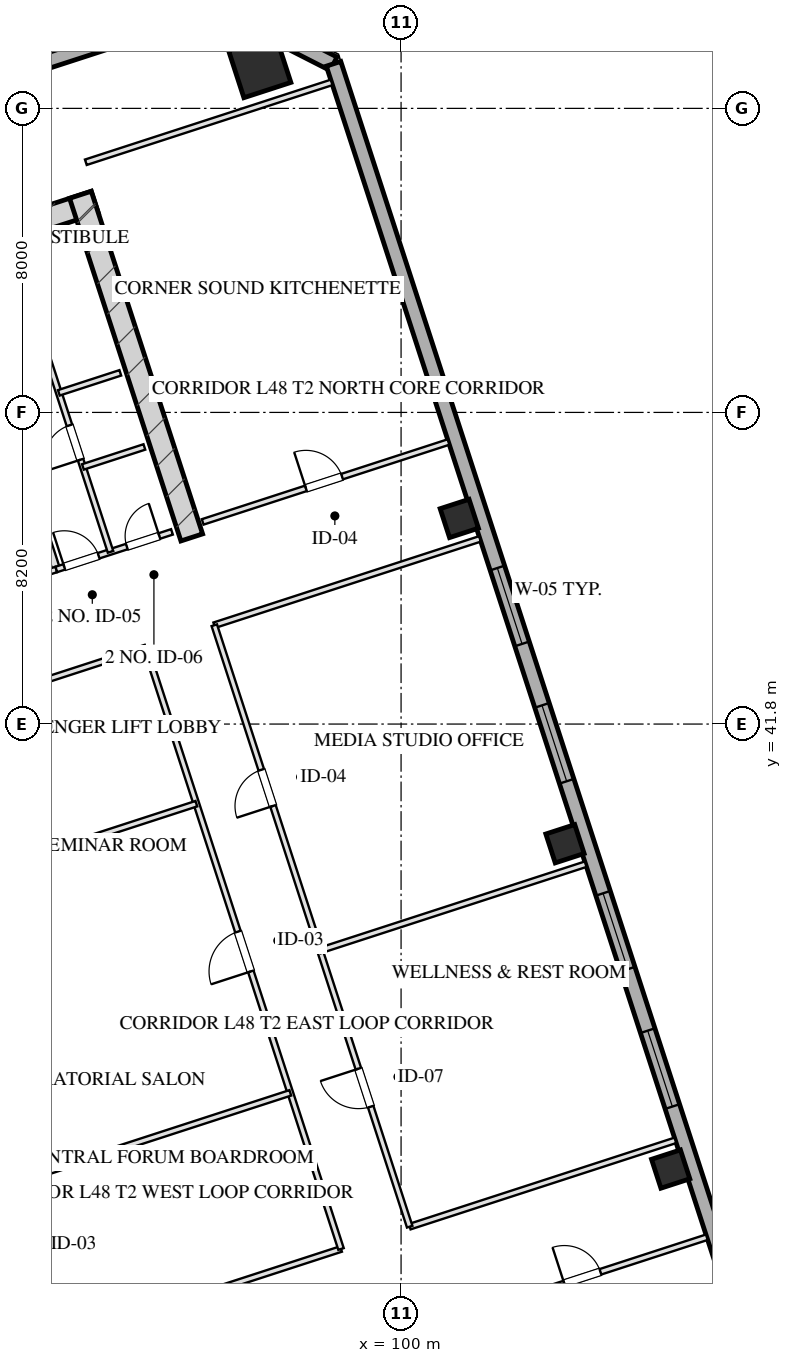
"""IFC4 building model, lengths in metres.
Left out: names, types, materials, properties, quantities, classifications, styles, units other than length and angle.
Written with IfcOpenShell. Run it as: python <this file> out.ifc"""

import sys

from ifc_helpers import new_model, si_unit, direction, frame, frame_2d, origin, origin_2d, place, context, subcontext, project, spatial, rectangle, hollow_rectangle, extrude, element, fill, save


model = new_model("IFC4")
c1 = context("Model", 3, precision=1e-05, world=origin(), true_north=direction((0.0, 1.0)))
c2 = subcontext(c1, "Body", "Model", "MODEL_VIEW")
j1 = project(units=[si_unit("LENGTHUNIT", "METRE"), si_unit("PLANEANGLEUNIT", "RADIAN")], contexts=[c1])
p1 = place(None, origin())
s1 = spatial("IfcSite", under=j1, at=p1, CompositionType="ELEMENT")
p2 = place(p1, origin())
s2 = spatial("IfcBuilding", under=s1, at=p2, CompositionType="ELEMENT")
p3 = place(p2, frame((0.0, 0.0, 180.55)))
s3 = spatial("IfcBuildingStorey", under=s2, at=p3, CompositionType="ELEMENT", Elevation=180.55)
p4 = place(p3, frame((76.344, 50.466, 0.0), z_axis=(0.0, 0.0, 1.0), x_axis=(0.951055727519, 0.309019421968, 0.0)))
e1 = element("IfcWall", 1, at=p4, inside=s3, PredefinedType="SHEAR", context=c2, shape_type="SweptSolid", body=[
    extrude(rectangle(XDim=16.4, YDim=0.6, at=frame_2d((8.2, 0.0))), origin(), (0.0, 0.0, 1.0), 3.45),
])
p5 = place(p3, frame((94.492, 46.71, 0.0), z_axis=(0.0, 0.0, 1.0), x_axis=(-0.309010370028, 0.95105866865, 0.0)))
e2 = element("IfcWall", 2, at=p5, inside=s3, PredefinedType="SHEAR", context=c2, shape_type="SweptSolid", body=[
    extrude(rectangle(XDim=9.48, YDim=0.6, at=frame_2d((4.74, 0.0))), origin(), (0.0, 0.0, 1.0), 3.45),
])
p6 = place(p3, frame((96.281, 59.099, 0.0), z_axis=(0.0, 0.0, 1.0), x_axis=(0.951056516295, 0.309016994375, 0.0)))
e3 = element("IfcColumn", 3, at=p6, inside=s3, PredefinedType="COLUMN", context=c2, shape_type="SweptSolid", body=[
    extrude(hollow_rectangle(XDim=1.3, YDim=1.3, WallThickness=0.045, at=origin_2d()), origin(), (0.0, 0.0, 1.0), 3.451),
])
for number, where, z_axis, x_axis in (
    (4, (107.094, 30.091, 0.0), (0.0, 0.0, 1.0), (0.951, 0.309, 0.0)),
    (5, (104.313, 38.651, 0.0), (0.0, 0.0, 1.0), (0.951, 0.309, 0.0)),
    (6, (101.532, 47.21, 0.0), (0.0, 0.0, 1.0), (0.951, 0.309, 0.0)),
):
    element("IfcColumn", number, at=place(p3, frame(where, z_axis=z_axis, x_axis=x_axis)), inside=s3, PredefinedType="COLUMN", context=c2, shape_type="SweptSolid", body=[
        extrude(hollow_rectangle(XDim=0.8, YDim=0.8, WallThickness=0.028, at=origin_2d()), origin(), (0.0, 0.0, 1.0), 3.451),
    ])
p7 = place(p3, frame((70.092, 52.556, 0.0), z_axis=(0.0, 0.0, 1.0), x_axis=(0.951057580055, 0.30901372044, 0.0)))
e7 = element("IfcWall", 7, at=p7, inside=s3, PredefinedType="SOLIDWALL", context=c2, shape_type="SweptSolid", body=[
    extrude(rectangle(XDim=26.4, YDim=0.4, at=frame_2d((13.2, 0.0))), origin(), (0.0, 0.0, 1.0), 2.55),
])
p8 = place(p3, frame((95.199, 60.714, 0.0), z_axis=(0.0, 0.0, 1.0), x_axis=(0.891020832027, -0.453962417932, 0.0)))
e8 = element("IfcWall", 8, at=p8, inside=s3, PredefinedType="SOLIDWALL", context=c2, shape_type="SweptSolid", body=[
    extrude(rectangle(XDim=3.394, YDim=0.4, at=frame_2d((1.697, 0.0))), origin(), (0.0, 0.0, 1.0), 2.55),
])
p9 = place(p3, frame((98.224, 59.173, 0.0), z_axis=(0.0, 0.0, 1.0), x_axis=(0.309014228706, -0.951057414911, 0.0)))
e9 = element("IfcWall", 9, at=p9, inside=s3, PredefinedType="SOLIDWALL", context=c2, shape_type="SweptSolid", body=[
    extrude(rectangle(XDim=42.8, YDim=0.4, at=frame_2d((21.4, 0.0))), origin(), (0.0, 0.0, 1.0), 2.55),
])
p10 = place(p9, frame((26.75, 0.0, 0.75)))
e10 = element("IfcOpeningElement", 10, at=p10, cuts=e9, PredefinedType="OPENING", context=c2, shape_type="SweptSolid", body=[
    extrude(rectangle(XDim=2.1, YDim=1.4, at=frame_2d((1.05, 0.7))), frame((0.0, 0.21, 0.0), z_axis=(0.0, -1.0, 0.0), x_axis=(1.0, 0.0, 0.0)), (0.0, 0.0, 1.0), 0.42),
])
p11 = place(p9, frame((22.95, 0.0, 0.75)))
e11 = element("IfcOpeningElement", 11, at=p11, cuts=e9, PredefinedType="OPENING", context=c2, shape_type="SweptSolid", body=[
    extrude(rectangle(XDim=2.1, YDim=1.4, at=frame_2d((1.05, 0.7))), frame((0.0, 0.21, 0.0), z_axis=(0.0, -1.0, 0.0), x_axis=(1.0, 0.0, 0.0)), (0.0, 0.0, 1.0), 0.42),
])
p12 = place(p9, frame((17.75, 0.0, 0.75)))
e12 = element("IfcOpeningElement", 12, at=p12, cuts=e9, PredefinedType="OPENING", context=c2, shape_type="SweptSolid", body=[
    extrude(rectangle(XDim=2.1, YDim=1.4, at=frame_2d((1.05, 0.7))), frame((0.0, 0.21, 0.0), z_axis=(0.0, -1.0, 0.0), x_axis=(1.0, 0.0, 0.0)), (0.0, 0.0, 1.0), 0.42),
])
p13 = place(p9, frame((13.95, 0.0, 0.75)))
e13 = element("IfcOpeningElement", 13, at=p13, cuts=e9, PredefinedType="OPENING", context=c2, shape_type="SweptSolid", body=[
    extrude(rectangle(XDim=2.1, YDim=1.4, at=frame_2d((1.05, 0.7))), frame((0.0, 0.21, 0.0), z_axis=(0.0, -1.0, 0.0), x_axis=(1.0, 0.0, 0.0)), (0.0, 0.0, 1.0), 0.42),
])
p14 = place(p3, frame((90.928, 45.868, 0.0), z_axis=(0.0, 0.0, 1.0), x_axis=(-0.309042196757, 0.951048327176, 0.0)))
e14 = element("IfcWall", 14, at=p14, inside=s3, PredefinedType="PARTITIONING", context=c2, shape_type="SweptSolid", body=[
    extrude(rectangle(XDim=8.43, YDim=0.2, at=frame_2d((4.215, 0.0))), origin(), (0.0, 0.0, 1.0), 3.155),
])
p15 = place(p3, frame((86.743, 44.508, 0.0), z_axis=(0.0, 0.0, 1.0), x_axis=(0.951063829732, 0.308994485023, 0.0)))
e15 = element("IfcWall", 15, at=p15, inside=s3, PredefinedType="PARTITIONING", context=c2, shape_type="SweptSolid", body=[
    extrude(rectangle(XDim=4.4, YDim=0.15, at=frame_2d((2.2, 0.0))), origin(), (0.0, 0.0, 1.0), 3.155),
])
p16 = place(p15, frame((1.45, 0.0, 0.0)))
e16 = element("IfcOpeningElement", 16, at=p16, cuts=e15, PredefinedType="OPENING", context=c2, shape_type="SweptSolid", body=[
    extrude(rectangle(XDim=1.5, YDim=2.05, at=frame_2d((0.75, 1.025))), frame((0.0, 0.085, 0.0), z_axis=(0.0, -1.0, 0.0), x_axis=(1.0, 0.0, 0.0)), (0.0, 0.0, 1.0), 0.17),
])
p17 = place(p3, frame((90.928, 45.868, 0.0), z_axis=(0.0, 0.0, 1.0), x_axis=(0.951059297078, 0.309008435874, 0.0)))
e17 = element("IfcWall", 17, at=p17, inside=s3, PredefinedType="PARTITIONING", context=c2, shape_type="SweptSolid", body=[
    extrude(rectangle(XDim=3.2, YDim=0.15, at=frame_2d((1.6, 0.0))), origin(), (0.0, 0.0, 1.0), 3.155),
])
p18 = place(p17, frame((0.22, 0.0, 0.0)))
e18 = element("IfcOpeningElement", 18, at=p18, cuts=e17, PredefinedType="OPENING", context=c2, shape_type="SweptSolid", body=[
    extrude(rectangle(XDim=0.95, YDim=2.05, at=frame_2d((0.475, 1.025))), frame((0.0, 0.085, 0.0), z_axis=(0.0, -1.0, 0.0), x_axis=(1.0, 0.0, 0.0)), (0.0, 0.0, 1.0), 0.17),
])
p19 = place(p17, frame((1.95, 0.0, 0.0)))
e19 = element("IfcOpeningElement", 19, at=p19, cuts=e17, PredefinedType="OPENING", context=c2, shape_type="SweptSolid", body=[
    extrude(rectangle(XDim=0.9, YDim=2.05, at=frame_2d((0.45, 1.025))), frame((0.0, 0.085, 0.0), z_axis=(0.0, -1.0, 0.0), x_axis=(1.0, 0.0, 0.0)), (0.0, 0.0, 1.0), 0.17),
])
p20 = place(p3, frame((92.355, 46.331, 0.0), z_axis=(0.0, 0.0, 1.0), x_axis=(-0.309007490203, 0.951059604335, 0.0)))
e20 = element("IfcWall", 20, at=p20, inside=s3, PredefinedType="PARTITIONING", context=c2, shape_type="SweptSolid", body=[
    extrude(rectangle(XDim=8.43, YDim=0.15, at=frame_2d((4.215, 0.0))), origin(), (0.0, 0.0, 1.0), 3.155),
])
p21 = place(p20, frame((2.55, 0.0, 0.0)))
e21 = element("IfcOpeningElement", 21, at=p21, cuts=e20, PredefinedType="OPENING", context=c2, shape_type="SweptSolid", body=[
    extrude(rectangle(XDim=0.95, YDim=2.05, at=frame_2d((0.475, 1.025))), frame((0.0, 0.085, 0.0), z_axis=(0.0, -1.0, 0.0), x_axis=(1.0, 0.0, 0.0)), (0.0, 0.0, 1.0), 0.17),
])
p22 = place(p20, frame((5.6, 0.0, 0.0)))
e22 = element("IfcOpeningElement", 22, at=p22, cuts=e20, PredefinedType="OPENING", context=c2, shape_type="SweptSolid", body=[
    extrude(rectangle(XDim=0.9, YDim=2.05, at=frame_2d((0.45, 1.025))), frame((0.0, 0.085, 0.0), z_axis=(0.0, -1.0, 0.0), x_axis=(1.0, 0.0, 0.0)), (0.0, 0.0, 1.0), 0.17),
])
p23 = place(p3, frame((90.995, 50.516, 0.0), z_axis=(0.0, 0.0, 1.0), x_axis=(0.951040401051, 0.309066587596, 0.0)))
e23 = element("IfcWall", 23, at=p23, inside=s3, PredefinedType="PARTITIONING", context=c2, shape_type="SweptSolid", body=[
    extrude(rectangle(XDim=1.7, YDim=0.15, at=frame_2d((0.85, 0.0))), origin(), (0.0, 0.0, 1.0), 3.155),
])
p24 = place(p3, frame((91.628, 48.566, 0.0), z_axis=(0.0, 0.0, 1.0), x_axis=(0.951054116971, 0.309024378638, 0.0)))
e24 = element("IfcWall", 24, at=p24, inside=s3, PredefinedType="PARTITIONING", context=c2, shape_type="SweptSolid", body=[
    extrude(rectangle(XDim=1.7, YDim=0.15, at=frame_2d((0.85, 0.0))), origin(), (0.0, 0.0, 1.0), 3.155),
])
p25 = place(p3, frame((101.578, 26.196, 0.0), z_axis=(0.0, 0.0, 1.0), x_axis=(0.951064934653, 0.308991084134, 0.0)))
e25 = element("IfcWall", 25, at=p25, inside=s3, PredefinedType="PARTITIONING", context=c2, shape_type="SweptSolid", body=[
    extrude(rectangle(XDim=6.8, YDim=0.15, at=frame_2d((3.4, 0.0))), origin(), (0.0, 0.0, 1.0), 3.155),
])
p26 = place(p25, frame((2.856, 0.0, 0.0)))
e26 = element("IfcOpeningElement", 26, at=p26, cuts=e25, PredefinedType="OPENING", context=c2, shape_type="SweptSolid", body=[
    extrude(rectangle(XDim=1.0, YDim=2.05, at=frame_2d((0.5, 1.025))), frame((0.0, 0.085, 0.0), z_axis=(0.0, -1.0, 0.0), x_axis=(1.0, 0.0, 0.0)), (0.0, 0.0, 1.0), 0.17),
])
p27 = place(p3, frame((91.705, 56.582, 0.0), z_axis=(0.0, 0.0, 1.0), x_axis=(0.951057811516, 0.309013008068, 0.0)))
e27 = element("IfcWall", 27, at=p27, inside=s3, PredefinedType="PARTITIONING", context=c2, shape_type="SweptSolid", body=[
    extrude(rectangle(XDim=6.8, YDim=0.15, at=frame_2d((3.4, 0.0))), origin(), (0.0, 0.0, 1.0), 3.155),
])
p28 = place(p3, frame((94.78, 47.119, 0.0), z_axis=(0.0, 0.0, 1.0), x_axis=(0.951057811516, 0.309013008068, 0.0)))
e28 = element("IfcWall", 28, at=p28, inside=s3, PredefinedType="PARTITIONING", context=c2, shape_type="SweptSolid", body=[
    extrude(rectangle(XDim=6.8, YDim=0.15, at=frame_2d((3.4, 0.0))), origin(), (0.0, 0.0, 1.0), 3.155),
])
p29 = place(p28, frame((2.856, 0.0, 0.0)))
e29 = element("IfcOpeningElement", 29, at=p29, cuts=e28, PredefinedType="OPENING", context=c2, shape_type="SweptSolid", body=[
    extrude(rectangle(XDim=1.0, YDim=2.05, at=frame_2d((0.5, 1.025))), frame((0.0, 0.085, 0.0), z_axis=(0.0, -1.0, 0.0), x_axis=(1.0, 0.0, 0.0)), (0.0, 0.0, 1.0), 0.17),
])
p30 = place(p3, frame((90.669, 25.469, 0.0), z_axis=(0.0, 0.0, 1.0), x_axis=(0.95106136293, 0.309002077568, 0.0)))
e30 = element("IfcWall", 30, at=p30, inside=s3, PredefinedType="PARTITIONING", context=c2, shape_type="SweptSolid", body=[
    extrude(rectangle(XDim=8.15, YDim=0.15, at=frame_2d((4.075, 0.0))), origin(), (0.0, 0.0, 1.0), 3.155),
])
p31 = place(p3, frame((100.227, 28.575, 0.0), z_axis=(0.0, 0.0, 1.0), x_axis=(0.95104773735, 0.309044011885, 0.0)))
e31 = element("IfcWall", 31, at=p31, inside=s3, PredefinedType="PARTITIONING", context=c2, shape_type="SweptSolid", body=[
    extrude(rectangle(XDim=7.35, YDim=0.15, at=frame_2d((3.675, 0.0))), origin(), (0.0, 0.0, 1.0), 3.155),
])
p32 = place(p3, frame((85.527, 41.295, 0.0), z_axis=(0.0, 0.0, 1.0), x_axis=(0.951055419664, 0.309020369437, 0.0)))
e32 = element("IfcWall", 32, at=p32, inside=s3, PredefinedType="PARTITIONING", context=c2, shape_type="SweptSolid", body=[
    extrude(rectangle(XDim=8.15, YDim=0.15, at=frame_2d((4.075, 0.0))), origin(), (0.0, 0.0, 1.0), 3.155),
])
p33 = place(p3, frame((95.085, 44.4, 0.0), z_axis=(0.0, 0.0, 1.0), x_axis=(0.95105749975, 0.309013967595, 0.0)))
e33 = element("IfcWall", 33, at=p33, inside=s3, PredefinedType="PARTITIONING", context=c2, shape_type="SweptSolid", body=[
    extrude(rectangle(XDim=7.35, YDim=0.15, at=frame_2d((3.675, 0.0))), origin(), (0.0, 0.0, 1.0), 3.155),
])
p34 = place(p3, frame((98.42, 27.988, 0.0), z_axis=(0.0, 0.0, 1.0), x_axis=(-0.309004459387, 0.951060589068, 0.0)))
e34 = element("IfcWall", 34, at=p34, inside=s3, PredefinedType="PARTITIONING", context=c2, shape_type="SweptSolid", body=[
    extrude(rectangle(XDim=16.64, YDim=0.15, at=frame_2d((8.32, 0.0))), origin(), (0.0, 0.0, 1.0), 3.155),
])
p35 = place(p34, frame((7.68, 0.0, 0.0)))
e35 = element("IfcOpeningElement", 35, at=p35, cuts=e34, PredefinedType="OPENING", context=c2, shape_type="SweptSolid", body=[
    extrude(rectangle(XDim=1.1, YDim=2.05, at=frame_2d((0.55, 1.025))), frame((0.0, 0.085, 0.0), z_axis=(0.0, -1.0, 0.0), x_axis=(1.0, 0.0, 0.0)), (0.0, 0.0, 1.0), 0.17),
])
p36 = place(p3, frame((100.227, 28.575, 0.0), z_axis=(0.0, 0.0, 1.0), x_axis=(-0.30901773025, 0.951056277195, 0.0)))
e36 = element("IfcWall", 36, at=p36, inside=s3, PredefinedType="PARTITIONING", context=c2, shape_type="SweptSolid", body=[
    extrude(rectangle(XDim=16.64, YDim=0.15, at=frame_2d((8.32, 0.0))), origin(), (0.0, 0.0, 1.0), 3.155),
])
p37 = place(p36, frame((3.32, 0.0, 0.0)))
e37 = element("IfcOpeningElement", 37, at=p37, cuts=e36, PredefinedType="OPENING", context=c2, shape_type="SweptSolid", body=[
    extrude(rectangle(XDim=1.05, YDim=2.05, at=frame_2d((0.525, 1.025))), frame((0.0, 0.085, 0.0), z_axis=(0.0, -1.0, 0.0), x_axis=(1.0, 0.0, 0.0)), (0.0, 0.0, 1.0), 0.17),
])
p38 = place(p36, frame((11.64, 0.0, 0.0)))
e38 = element("IfcOpeningElement", 38, at=p38, cuts=e36, PredefinedType="OPENING", context=c2, shape_type="SweptSolid", body=[
    extrude(rectangle(XDim=1.0, YDim=2.05, at=frame_2d((0.5, 1.025))), frame((0.0, 0.085, 0.0), z_axis=(0.0, -1.0, 0.0), x_axis=(1.0, 0.0, 0.0)), (0.0, 0.0, 1.0), 0.17),
])
p39 = place(p3, frame((89.334, 29.578, 0.0), z_axis=(0.0, 0.0, 1.0), x_axis=(0.951052558989, 0.309029173445, 0.0)))
e39 = element("IfcWall", 39, at=p39, inside=s3, PredefinedType="PARTITIONING", context=c2, shape_type="SweptSolid", body=[
    extrude(rectangle(XDim=8.15, YDim=0.15, at=frame_2d((4.075, 0.0))), origin(), (0.0, 0.0, 1.0), 3.155),
])
p40 = place(p3, frame((86.862, 37.186, 0.0), z_axis=(0.0, 0.0, 1.0), x_axis=(0.95106422313, 0.308993274169, 0.0)))
e40 = element("IfcWall", 40, at=p40, inside=s3, PredefinedType="PARTITIONING", context=c2, shape_type="SweptSolid", body=[
    extrude(rectangle(XDim=8.15, YDim=0.15, at=frame_2d((4.075, 0.0))), origin(), (0.0, 0.0, 1.0), 3.155),
])
p41 = place(p3, frame((97.866, 35.841, 0.0), z_axis=(0.0, 0.0, 1.0), x_axis=(0.95105749975, 0.309013967595, 0.0)))
e41 = element("IfcWall", 41, at=p41, inside=s3, PredefinedType="PARTITIONING", context=c2, shape_type="SweptSolid", body=[
    extrude(rectangle(XDim=7.35, YDim=0.15, at=frame_2d((3.675, 0.0))), origin(), (0.0, 0.0, 1.0), 3.155),
])
p42 = place(p10, origin())
e42 = element("IfcWindow", 42, at=p42, inside=s3, PartitioningType="TRIPLE_PANEL_VERTICAL", PredefinedType="WINDOW", context=c2, shape_type="SweptSolid", body=[
    extrude(rectangle(XDim=2.1, YDim=1.4, at=frame_2d((1.05, 0.7))), frame((0.0, 0.03, 0.0), z_axis=(0.0, -1.0, 0.0), x_axis=(1.0, 0.0, 0.0)), (0.0, 0.0, 1.0), 0.06),
])
fill(e10, e42)
p43 = place(p11, origin())
e43 = element("IfcWindow", 43, at=p43, inside=s3, PartitioningType="TRIPLE_PANEL_VERTICAL", PredefinedType="WINDOW", context=c2, shape_type="SweptSolid", body=[
    extrude(rectangle(XDim=2.1, YDim=1.4, at=frame_2d((1.05, 0.7))), frame((0.0, 0.03, 0.0), z_axis=(0.0, -1.0, 0.0), x_axis=(1.0, 0.0, 0.0)), (0.0, 0.0, 1.0), 0.06),
])
fill(e11, e43)
p44 = place(p12, origin())
e44 = element("IfcWindow", 44, at=p44, inside=s3, PartitioningType="TRIPLE_PANEL_VERTICAL", PredefinedType="WINDOW", context=c2, shape_type="SweptSolid", body=[
    extrude(rectangle(XDim=2.1, YDim=1.4, at=frame_2d((1.05, 0.7))), frame((0.0, 0.03, 0.0), z_axis=(0.0, -1.0, 0.0), x_axis=(1.0, 0.0, 0.0)), (0.0, 0.0, 1.0), 0.06),
])
fill(e12, e44)
p45 = place(p13, origin())
e45 = element("IfcWindow", 45, at=p45, inside=s3, PartitioningType="TRIPLE_PANEL_VERTICAL", PredefinedType="WINDOW", context=c2, shape_type="SweptSolid", body=[
    extrude(rectangle(XDim=2.1, YDim=1.4, at=frame_2d((1.05, 0.7))), frame((0.0, 0.03, 0.0), z_axis=(0.0, -1.0, 0.0), x_axis=(1.0, 0.0, 0.0)), (0.0, 0.0, 1.0), 0.06),
])
fill(e13, e45)
p46 = place(p18, origin())
e46 = element("IfcDoor", 46, at=p46, inside=s3, OperationType="SINGLE_SWING_LEFT", PredefinedType="DOOR", context=c2, shape_type="SweptSolid", body=[
    extrude(rectangle(XDim=0.95, YDim=2.05, at=frame_2d((0.475, 1.025))), frame((0.0, 0.025, 0.0), z_axis=(0.0, -1.0, 0.0), x_axis=(1.0, 0.0, 0.0)), (0.0, 0.0, 1.0), 0.05),
])
fill(e18, e46)
p47 = place(p19, origin())
e47 = element("IfcDoor", 47, at=p47, inside=s3, OperationType="SINGLE_SWING_RIGHT", PredefinedType="DOOR", context=c2, shape_type="SweptSolid", body=[
    extrude(rectangle(XDim=0.9, YDim=2.05, at=frame_2d((0.45, 1.025))), frame((0.0, 0.025, 0.0), z_axis=(0.0, -1.0, 0.0), x_axis=(1.0, 0.0, 0.0)), (0.0, 0.0, 1.0), 0.05),
])
fill(e19, e47)
p48 = place(p21, origin())
e48 = element("IfcDoor", 48, at=p48, inside=s3, OperationType="SINGLE_SWING_LEFT", PredefinedType="DOOR", context=c2, shape_type="SweptSolid", body=[
    extrude(rectangle(XDim=0.95, YDim=2.05, at=frame_2d((0.475, 1.025))), frame((0.0, 0.025, 0.0), z_axis=(0.0, -1.0, 0.0), x_axis=(1.0, 0.0, 0.0)), (0.0, 0.0, 1.0), 0.05),
])
fill(e21, e48)
p49 = place(p26, origin())
e49 = element("IfcDoor", 49, at=p49, inside=s3, OperationType="SINGLE_SWING_LEFT", PredefinedType="DOOR", context=c2, shape_type="SweptSolid", body=[
    extrude(rectangle(XDim=1.0, YDim=2.05, at=frame_2d((0.5, 1.025))), frame((0.0, 0.025, 0.0), z_axis=(0.0, -1.0, 0.0), x_axis=(1.0, 0.0, 0.0)), (0.0, 0.0, 1.0), 0.05),
])
fill(e26, e49)
p50 = place(p29, origin())
e50 = element("IfcDoor", 50, at=p50, inside=s3, OperationType="SINGLE_SWING_LEFT", PredefinedType="DOOR", context=c2, shape_type="SweptSolid", body=[
    extrude(rectangle(XDim=1.0, YDim=2.05, at=frame_2d((0.5, 1.025))), frame((0.0, 0.025, 0.0), z_axis=(0.0, -1.0, 0.0), x_axis=(1.0, 0.0, 0.0)), (0.0, 0.0, 1.0), 0.05),
])
fill(e29, e50)
p51 = place(p35, origin())
e51 = element("IfcDoor", 51, at=p51, inside=s3, OperationType="SINGLE_SWING_LEFT", PredefinedType="DOOR", context=c2, shape_type="SweptSolid", body=[
    extrude(rectangle(XDim=1.1, YDim=2.05, at=frame_2d((0.55, 1.025))), frame((0.0, 0.025, 0.0), z_axis=(0.0, -1.0, 0.0), x_axis=(1.0, 0.0, 0.0)), (0.0, 0.0, 1.0), 0.05),
])
fill(e35, e51)
p52 = place(p37, origin())
e52 = element("IfcDoor", 52, at=p52, inside=s3, OperationType="SINGLE_SWING_RIGHT", PredefinedType="DOOR", context=c2, shape_type="SweptSolid", body=[
    extrude(rectangle(XDim=1.05, YDim=2.05, at=frame_2d((0.525, 1.025))), frame((0.0, 0.025, 0.0), z_axis=(0.0, -1.0, 0.0), x_axis=(1.0, 0.0, 0.0)), (0.0, 0.0, 1.0), 0.05),
])
fill(e37, e52)
p53 = place(p38, origin())
e53 = element("IfcDoor", 53, at=p53, inside=s3, OperationType="SINGLE_SWING_LEFT", PredefinedType="DOOR", context=c2, shape_type="SweptSolid", body=[
    extrude(rectangle(XDim=1.0, YDim=2.05, at=frame_2d((0.5, 1.025))), frame((0.0, 0.025, 0.0), z_axis=(0.0, -1.0, 0.0), x_axis=(1.0, 0.0, 0.0)), (0.0, 0.0, 1.0), 0.05),
])
fill(e38, e53)
save(model, sys.argv[1])
